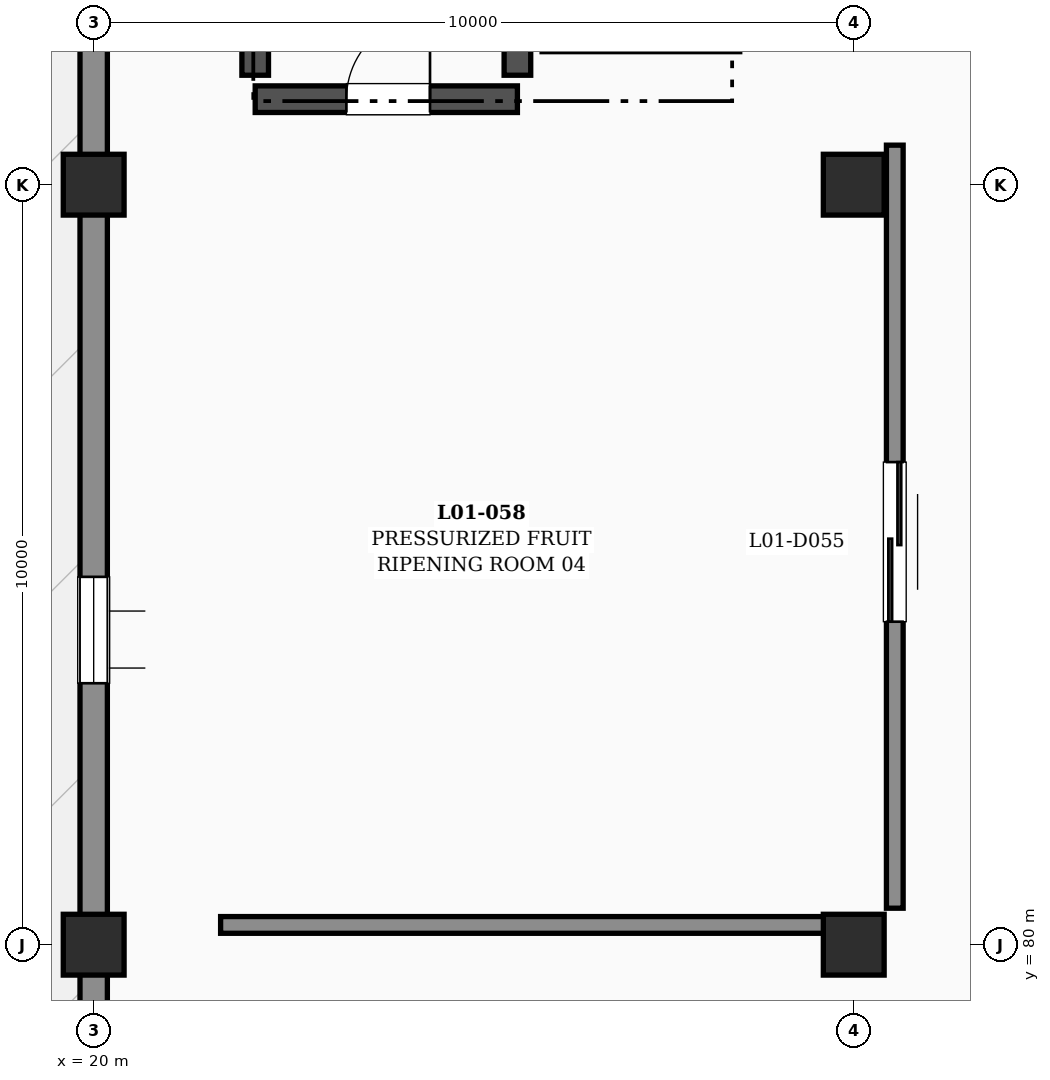
"""IFC4 building model, lengths in metres.
Left out: names, types, materials, properties, quantities, classifications, styles, units other than length and angle.
Written with IfcOpenShell. Run it as: python <this file> out.ifc"""

import sys

from ifc_helpers import new_model, si_unit, direction, frame, frame_2d, origin, origin_2d, place, context, subcontext, project, spatial, rectangle, extrude, element, fill, save


model = new_model("IFC4")
c1 = context("Model", 3, precision=1e-05, world=origin(), true_north=direction((0.0, 1.0)))
c2 = subcontext(c1, "Body", "Model", "MODEL_VIEW")
j1 = project(units=[si_unit("LENGTHUNIT", "METRE"), si_unit("PLANEANGLEUNIT", "RADIAN")], contexts=[c1])
p1 = place(None, origin())
s1 = spatial("IfcSite", under=j1, at=p1, CompositionType="ELEMENT")
p2 = place(p1, origin())
s2 = spatial("IfcBuilding", under=s1, at=p2, CompositionType="ELEMENT")
p3 = place(p2, frame((0.0, 0.0, 6.0)))
s3 = spatial("IfcBuildingStorey", under=s2, at=p3, CompositionType="ELEMENT", Elevation=6.0)
for number, where, z_axis, x_axis in (
    (1, (20.0, 80.0, 0.0), (0.0, 0.0, 1.0), (1.0, 0.0, 0.0)),
    (2, (20.0, 90.0, 0.0), (0.0, 0.0, 1.0), (1.0, 0.0, 0.0)),
    (3, (30.0, 80.0, 0.0), (0.0, 0.0, 1.0), (1.0, 0.0, 0.0)),
    (4, (30.0, 90.0, 0.0), (0.0, 0.0, 1.0), (1.0, 0.0, 0.0)),
):
    element("IfcColumn", number, at=place(p3, frame(where, z_axis=z_axis, x_axis=x_axis)), inside=s3, PredefinedType="COLUMN", context=c2, shape_type="SweptSolid", body=[
        extrude(rectangle(XDim=0.8, YDim=0.8, at=origin_2d()), origin(), (0.0, 0.0, 1.0), 4.8),
    ])
p4 = place(p3, frame((20.0, 70.24, 0.0), z_axis=(0.0, 0.0, 1.0), x_axis=(0.0, 1.0, 0.0)))
e5 = element("IfcWall", 5, at=p4, inside=s3, PredefinedType="SOLIDWALL", context=c2, shape_type="SweptSolid", body=[
    extrude(rectangle(XDim=9.52, YDim=0.36, at=frame_2d((4.76, 0.0))), origin(), (0.0, 0.0, 1.0), 3.61),
])
p5 = place(p4, frame((3.2, 0.0, 1.2)))
e6 = element("IfcOpeningElement", 6, at=p5, cuts=e5, PredefinedType="OPENING", context=c2, shape_type="SweptSolid", body=[
    extrude(rectangle(XDim=1.4, YDim=1.35, at=frame_2d((0.7, 0.675))), frame((0.0, 0.19, 0.0), z_axis=(0.0, -1.0, 0.0), x_axis=(1.0, 0.0, 0.0)), (0.0, 0.0, 1.0), 0.38),
])
p6 = place(p3, frame((20.0, 80.24, 0.0), z_axis=(0.0, 0.0, 1.0), x_axis=(0.0, 1.0, 0.0)))
e7 = element("IfcWall", 7, at=p6, inside=s3, PredefinedType="SOLIDWALL", context=c2, shape_type="SweptSolid", body=[
    extrude(rectangle(XDim=9.52, YDim=0.36, at=frame_2d((4.76, 0.0))), origin(), (0.0, 0.0, 1.0), 3.61),
])
p7 = place(p6, frame((3.2, 0.0, 1.2)))
e8 = element("IfcOpeningElement", 8, at=p7, cuts=e7, PredefinedType="OPENING", context=c2, shape_type="SweptSolid", body=[
    extrude(rectangle(XDim=1.4, YDim=1.35, at=frame_2d((0.7, 0.675))), frame((0.0, 0.19, 0.0), z_axis=(0.0, -1.0, 0.0), x_axis=(1.0, 0.0, 0.0)), (0.0, 0.0, 1.0), 0.38),
])
p8 = place(p3, frame((20.0, 90.24, 0.0), z_axis=(0.0, 0.0, 1.0), x_axis=(0.0, 1.0, 0.0)))
e9 = element("IfcWall", 9, at=p8, inside=s3, PredefinedType="SOLIDWALL", context=c2, shape_type="SweptSolid", body=[
    extrude(rectangle(XDim=9.52, YDim=0.36, at=frame_2d((4.76, 0.0))), origin(), (0.0, 0.0, 1.0), 3.61),
])
p9 = place(p8, frame((3.2, 0.0, 1.2)))
e10 = element("IfcOpeningElement", 10, at=p9, cuts=e9, PredefinedType="OPENING", context=c2, shape_type="SweptSolid", body=[
    extrude(rectangle(XDim=1.4, YDim=1.35, at=frame_2d((0.7, 0.675))), frame((0.0, 0.19, 0.0), z_axis=(0.0, -1.0, 0.0), x_axis=(1.0, 0.0, 0.0)), (0.0, 0.0, 1.0), 0.38),
])
p10 = place(p3, frame((22.125, 91.125, 0.0), z_axis=(0.0, 0.0, 1.0), x_axis=(1.0, 0.0, 0.0)))
e11 = element("IfcWall", 11, at=p10, inside=s3, PredefinedType="SHEAR", context=c2, shape_type="SweptSolid", body=[
    extrude(rectangle(XDim=3.45, YDim=0.35, at=frame_2d((1.725, 0.0))), origin(), (0.0, 0.0, 1.0), 4.8),
])
p11 = place(p10, frame((1.2, 0.0, 0.0)))
e12 = element("IfcOpeningElement", 12, at=p11, cuts=e11, PredefinedType="OPENING", context=c2, shape_type="SweptSolid", body=[
    extrude(rectangle(XDim=1.1, YDim=2.2, at=frame_2d((0.55, 1.1))), frame((0.0, 0.185, 0.0), z_axis=(0.0, -1.0, 0.0), x_axis=(1.0, 0.0, 0.0)), (0.0, 0.0, 1.0), 0.37),
])
for number, where, z_axis, x_axis in (
    (13, (22.125, 91.44, 0.0), (0.0, 0.0, 1.0), (0.0, 1.0, 0.0)),
    (14, (25.575, 91.44, 0.0), (0.0, 0.0, 1.0), (0.0, 1.0, 0.0)),
):
    element("IfcWall", number, at=place(p3, frame(where, z_axis=z_axis, x_axis=x_axis)), inside=s3, PredefinedType="SHEAR", context=c2, shape_type="SweptSolid", body=[
        extrude(rectangle(XDim=7.12, YDim=0.35, at=frame_2d((3.56, 0.0))), origin(), (0.0, 0.0, 1.0), 4.8),
    ])
p12 = place(p3, frame((30.54, 90.52, 0.0), z_axis=(0.0, 0.0, 1.0), x_axis=(0.0, -1.0, 0.0)))
e15 = element("IfcWall", 15, at=p12, inside=s3, PredefinedType="PARTITIONING", context=c2, shape_type="SweptSolid", body=[
    extrude(rectangle(XDim=10.04, YDim=0.22, at=frame_2d((5.02, 0.0))), origin(), (0.0, 0.0, 1.0), 3.51),
])
p13 = place(p12, frame((4.17, 0.0, 0.0)))
e16 = element("IfcOpeningElement", 16, at=p13, cuts=e15, PredefinedType="OPENING", context=c2, shape_type="SweptSolid", body=[
    extrude(rectangle(XDim=2.1, YDim=2.4, at=frame_2d((1.05, 1.2))), frame((0.0, 0.12, 0.0), z_axis=(0.0, -1.0, 0.0), x_axis=(1.0, 0.0, 0.0)), (0.0, 0.0, 1.0), 0.24),
])
p14 = place(p3, frame((30.32, 80.26, 0.0), z_axis=(0.0, 0.0, 1.0), x_axis=(-1.0, 0.0, 0.0)))
e17 = element("IfcWall", 17, at=p14, inside=s3, PredefinedType="PARTITIONING", context=c2, shape_type="SweptSolid", body=[
    extrude(rectangle(XDim=8.65, YDim=0.22, at=frame_2d((4.325, 0.0))), origin(), (0.0, 0.0, 1.0), 3.51),
])
p15 = place(p7, origin())
e18 = element("IfcWindow", 18, at=p15, inside=s3, PartitioningType="SINGLE_PANEL", PredefinedType="WINDOW", context=c2, shape_type="SweptSolid", body=[
    extrude(rectangle(XDim=1.4, YDim=1.35, at=frame_2d((0.7, 0.675))), frame((0.0, 0.03, 0.0), z_axis=(0.0, -1.0, 0.0), x_axis=(1.0, 0.0, 0.0)), (0.0, 0.0, 1.0), 0.06),
])
fill(e8, e18)
p16 = place(p11, origin())
e19 = element("IfcDoor", 19, at=p16, inside=s3, OperationType="SINGLE_SWING_RIGHT", PredefinedType="DOOR", context=c2, shape_type="SweptSolid", body=[
    extrude(rectangle(XDim=1.1, YDim=2.2, at=frame_2d((0.55, 1.1))), frame((0.0, 0.025, 0.0), z_axis=(0.0, -1.0, 0.0), x_axis=(1.0, 0.0, 0.0)), (0.0, 0.0, 1.0), 0.05),
])
fill(e12, e19)
p17 = place(p13, origin())
e20 = element("IfcDoor", 20, at=p17, inside=s3, OperationType="DOUBLE_DOOR_SLIDING", PredefinedType="DOOR", context=c2, shape_type="SweptSolid", body=[
    extrude(rectangle(XDim=2.1, YDim=2.4, at=frame_2d((1.05, 1.2))), frame((0.0, 0.025, 0.0), z_axis=(0.0, -1.0, 0.0), x_axis=(1.0, 0.0, 0.0)), (0.0, 0.0, 1.0), 0.05),
])
fill(e16, e20)
save(model, sys.argv[1])
